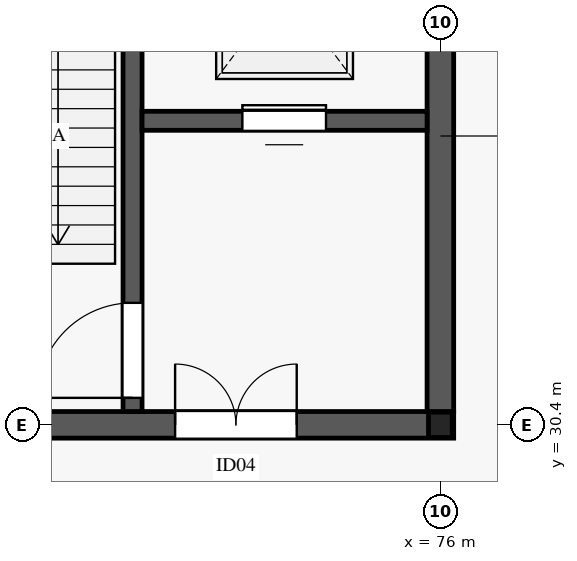
"""IFC4 building model, lengths in metres.
Left out: names, types, materials, properties, quantities, classifications, styles, units other than length and angle.
Written with IfcOpenShell. Run it as: python <this file> out.ifc"""

import sys

from ifc_helpers import new_model, si_unit, direction, frame, frame_2d, origin, origin_2d, place, context, subcontext, project, spatial, rectangle, i_section, extrude, element, fill, save


model = new_model("IFC4")
c1 = context("Model", 3, precision=1e-05, world=origin(), true_north=direction((0.0, 1.0)))
c2 = subcontext(c1, "Body", "Model", "MODEL_VIEW")
j1 = project(units=[si_unit("LENGTHUNIT", "METRE"), si_unit("PLANEANGLEUNIT", "RADIAN")], contexts=[c1])
p1 = place(None, origin())
s1 = spatial("IfcSite", under=j1, at=p1, CompositionType="ELEMENT")
p2 = place(p1, origin())
s2 = spatial("IfcBuilding", under=s1, at=p2, CompositionType="ELEMENT")
p3 = place(p2, origin())
s3 = spatial("IfcBuildingStorey", under=s2, at=p3, CompositionType="ELEMENT", Elevation=0.0)
p4 = place(p3, frame((76.0, 30.4, 0.0), z_axis=(0.0, 0.0, 1.0), x_axis=(1.0, 0.0, 0.0)))
e1 = element("IfcColumn", 1, at=p4, inside=s3, PredefinedType="COLUMN", context=c2, shape_type="SweptSolid", body=[
    extrude(i_section(OverallWidth=0.313, OverallDepth=0.333, WebThickness=0.018, FlangeThickness=0.028, FilletRadius=0.015, at=origin_2d()), origin(), (0.0, 0.0, 1.0), 5.185),
])
p5 = place(p3, frame((67.825, 30.4, 0.0), z_axis=(0.0, 0.0, 1.0), x_axis=(1.0, 0.0, 0.0)))
e2 = element("IfcWall", 2, at=p5, inside=s3, PredefinedType="SHEAR", context=c2, shape_type="SweptSolid", body=[
    extrude(rectangle(XDim=8.35, YDim=0.35, at=frame_2d((4.175, 0.0))), origin(), (0.0, 0.0, 1.0), 5.19),
])
p6 = place(p5, frame((4.685, 0.0, 0.0)))
e3 = element("IfcOpeningElement", 3, at=p6, cuts=e2, PredefinedType="OPENING", context=c2, shape_type="SweptSolid", body=[
    extrude(rectangle(XDim=1.6, YDim=2.35, at=frame_2d((0.8, 1.175))), frame((0.0, 0.185, 0.0), z_axis=(0.0, -1.0, 0.0), x_axis=(1.0, 0.0, 0.0)), (0.0, 0.0, 1.0), 0.37),
])
p7 = place(p3, frame((76.0, 30.575, 0.0), z_axis=(0.0, 0.0, 1.0), x_axis=(0.0, 1.0, 0.0)))
e4 = element("IfcWall", 4, at=p7, inside=s3, PredefinedType="SHEAR", context=c2, shape_type="SweptSolid", body=[
    extrude(rectangle(XDim=7.25, YDim=0.35, at=frame_2d((3.625, 0.0))), origin(), (0.0, 0.0, 1.0), 5.19),
])
p8 = place(p3, frame((71.95, 30.575, 0.0), z_axis=(0.0, 0.0, 1.0), x_axis=(0.0, 1.0, 0.0)))
e5 = element("IfcWall", 5, at=p8, inside=s3, PredefinedType="SHEAR", context=c2, shape_type="SweptSolid", body=[
    extrude(rectangle(XDim=7.25, YDim=0.25, at=frame_2d((3.625, 0.0))), origin(), (0.0, 0.0, 1.0), 5.19),
])
p9 = place(p8, frame((0.18, 0.0, 0.0)))
e6 = element("IfcOpeningElement", 6, at=p9, cuts=e5, PredefinedType="OPENING", context=c2, shape_type="SweptSolid", body=[
    extrude(rectangle(XDim=1.25, YDim=2.2, at=frame_2d((0.625, 1.1))), frame((0.0, 0.135, 0.0), z_axis=(0.0, -1.0, 0.0), x_axis=(1.0, 0.0, 0.0)), (0.0, 0.0, 1.0), 0.27),
])
p10 = place(p3, frame((72.075, 34.4, 0.0), z_axis=(0.0, 0.0, 1.0), x_axis=(1.0, 0.0, 0.0)))
e7 = element("IfcWall", 7, at=p10, inside=s3, PredefinedType="SHEAR", context=c2, shape_type="SweptSolid", body=[
    extrude(rectangle(XDim=3.75, YDim=0.25, at=frame_2d((1.875, 0.0))), origin(), (0.0, 0.0, 1.0), 5.19),
])
p11 = place(p10, frame((1.32, 0.0, 0.0)))
e8 = element("IfcOpeningElement", 8, at=p11, cuts=e7, PredefinedType="OPENING", context=c2, shape_type="SweptSolid", body=[
    extrude(rectangle(XDim=1.1, YDim=2.2, at=frame_2d((0.55, 1.1))), frame((0.0, 0.135, 0.0), z_axis=(0.0, -1.0, 0.0), x_axis=(1.0, 0.0, 0.0)), (0.0, 0.0, 1.0), 0.27),
])
p12 = place(p9, origin())
e9 = element("IfcDoor", 9, at=p12, inside=s3, OperationType="SINGLE_SWING_LEFT", PredefinedType="DOOR", context=c2, shape_type="SweptSolid", body=[
    extrude(rectangle(XDim=1.25, YDim=2.2, at=frame_2d((0.625, 1.1))), frame((0.0, 0.025, 0.0), z_axis=(0.0, -1.0, 0.0), x_axis=(1.0, 0.0, 0.0)), (0.0, 0.0, 1.0), 0.05),
])
fill(e6, e9)
p13 = place(p6, origin())
e10 = element("IfcDoor", 10, at=p13, inside=s3, OperationType="DOUBLE_DOOR_SINGLE_SWING", PredefinedType="DOOR", context=c2, shape_type="SweptSolid", body=[
    extrude(rectangle(XDim=1.6, YDim=2.35, at=frame_2d((0.8, 1.175))), frame((0.0, 0.025, 0.0), z_axis=(0.0, -1.0, 0.0), x_axis=(1.0, 0.0, 0.0)), (0.0, 0.0, 1.0), 0.05),
])
fill(e3, e10)
p14 = place(p11, origin())
e11 = element("IfcDoor", 11, at=p14, inside=s3, OperationType="SLIDING_TO_LEFT", PredefinedType="DOOR", context=c2, shape_type="SweptSolid", body=[
    extrude(rectangle(XDim=1.1, YDim=2.2, at=frame_2d((0.55, 1.1))), frame((0.0, 0.025, 0.0), z_axis=(0.0, -1.0, 0.0), x_axis=(1.0, 0.0, 0.0)), (0.0, 0.0, 1.0), 0.05),
])
fill(e8, e11)
save(model, sys.argv[1])
